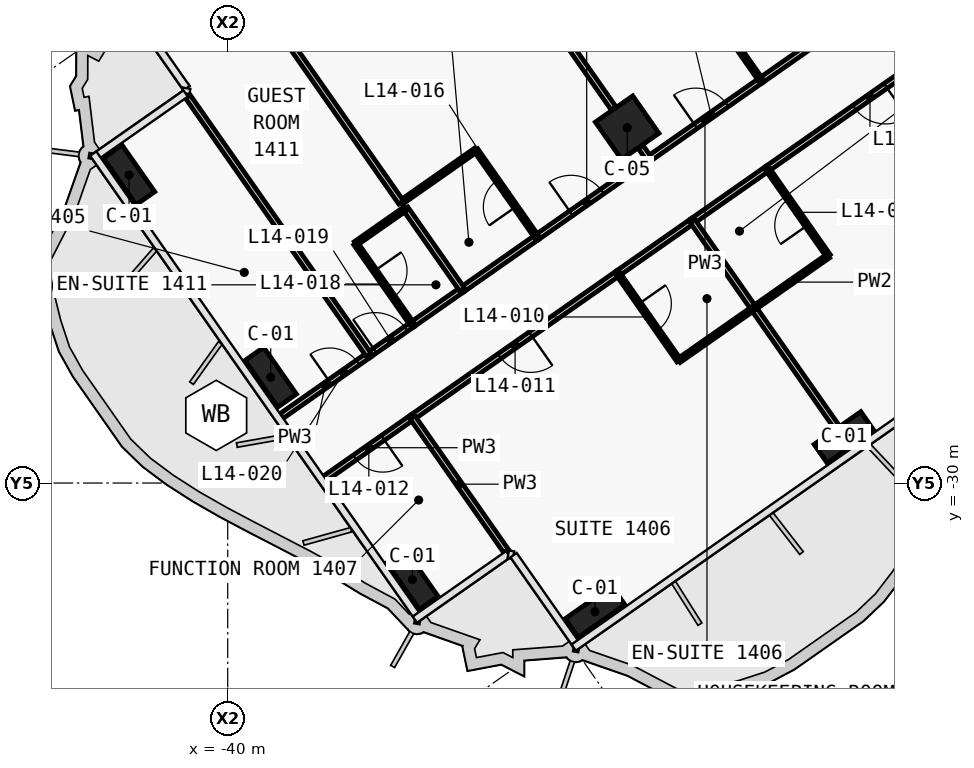
"""IFC4 building model, lengths in metres.
Left out: names, types, materials, properties, quantities, classifications, styles, units other than length and angle.
Written with IfcOpenShell. Run it as: python <this file> out.ifc"""

import sys

from ifc_helpers import new_model, si_unit, direction, frame, frame_2d, origin, origin_2d, place, context, subcontext, project, spatial, rectangle, extrude, element, fill, save


model = new_model("IFC4")
c1 = context("Model", 3, precision=1e-05, world=origin(), true_north=direction((0.0, 1.0)))
c2 = subcontext(c1, "Body", "Model", "MODEL_VIEW")
j1 = project(units=[si_unit("LENGTHUNIT", "METRE"), si_unit("PLANEANGLEUNIT", "RADIAN")], contexts=[c1])
p1 = place(None, origin())
s1 = spatial("IfcSite", under=j1, at=p1, CompositionType="ELEMENT")
p2 = place(p1, origin())
s2 = spatial("IfcBuilding", under=s1, at=p2, CompositionType="ELEMENT")
p3 = place(p2, frame((0.0, 0.0, 76.1)))
s3 = spatial("IfcBuildingStorey", under=s2, at=p3, CompositionType="ELEMENT", Elevation=76.1)
for number, where, z_axis, x_axis in (
    (1, (-23.782, -28.799, 0.0), (0.0, 0.0, 1.0), (-0.819, -0.574, 0.0)),
    (2, (-30.336, -33.388, 0.0), (0.0, 0.0, 1.0), (-0.819, -0.574, 0.0)),
    (3, (-35.14, -32.541, 0.0), (0.0, 0.0, 1.0), (-0.574, 0.819, 0.0)),
    (4, (-38.869, -27.216, 0.0), (0.0, 0.0, 1.0), (-0.574, 0.819, 0.0)),
    (5, (-42.597, -21.892, 0.0), (0.0, 0.0, 1.0), (-0.574, 0.819, 0.0)),
):
    element("IfcColumn", number, at=place(p3, frame(where, z_axis=z_axis, x_axis=x_axis)), inside=s3, PredefinedType="COLUMN", context=c2, shape_type="SweptSolid", body=[
        extrude(rectangle(XDim=1.5, YDim=0.6, at=origin_2d()), origin(), (0.0, 0.0, 1.0), 3.6),
    ])
p4 = place(p3, frame((-29.49, -20.649, 0.0), z_axis=(0.0, 0.0, 1.0), x_axis=(-0.819152044289, -0.573576436351, 0.0)))
e6 = element("IfcColumn", 6, at=p4, inside=s3, PredefinedType="COLUMN", context=c2, shape_type="SweptSolid", body=[
    extrude(rectangle(XDim=1.2, YDim=1.2, at=origin_2d()), origin(), (0.0, 0.0, 1.0), 3.6),
])
p5 = place(p3, frame((-28.917, -21.469, 0.0), z_axis=(0.0, 0.0, 1.0), x_axis=(0.81917779803, 0.57353965444, 0.0)))
e7 = element("IfcWall", 7, at=p5, inside=s3, PredefinedType="PARTITIONING", context=c2, shape_type="SweptSolid", body=[
    extrude(rectangle(XDim=3.603, YDim=0.15, at=frame_2d((1.801, 0.0))), origin(), (0.0, 0.0, 1.0), 2.6),
])
p6 = place(p5, frame((1.502, 0.0, 0.0)))
e8 = element("IfcOpeningElement", 8, at=p6, cuts=e7, PredefinedType="OPENING", context=c2, shape_type="SweptSolid", body=[
    extrude(rectangle(XDim=1.0, YDim=2.1, at=frame_2d((0.5, 1.05))), frame((0.0, 0.085, 0.0), z_axis=(0.0, -1.0, 0.0), x_axis=(1.0, 0.0, 0.0)), (0.0, 0.0, 1.0), 0.17),
])
p7 = place(p3, frame((-25.969, -19.404, 0.0), z_axis=(0.0, 0.0, 1.0), x_axis=(0.819146032251, 0.573585022335, 0.0)))
e9 = element("IfcWall", 9, at=p7, inside=s3, PredefinedType="PARTITIONING", context=c2, shape_type="SweptSolid", body=[
    extrude(rectangle(XDim=2.404, YDim=0.15, at=frame_2d((1.202, 0.0))), origin(), (0.0, 0.0, 1.0), 3.32),
])
p8 = place(p3, frame((-31.866, -23.533, 0.0), z_axis=(0.0, 0.0, 1.0), x_axis=(0.819145961204, 0.573585123798, 0.0)))
e10 = element("IfcWall", 10, at=p8, inside=s3, PredefinedType="PARTITIONING", context=c2, shape_type="SweptSolid", body=[
    extrude(rectangle(XDim=3.603, YDim=0.15, at=frame_2d((1.802, 0.0))), origin(), (0.0, 0.0, 1.0), 2.6),
])
p9 = place(p8, frame((1.101, 0.0, 0.0)))
e11 = element("IfcOpeningElement", 11, at=p9, cuts=e10, PredefinedType="OPENING", context=c2, shape_type="SweptSolid", body=[
    extrude(rectangle(XDim=1.0, YDim=2.1, at=frame_2d((0.5, 1.05))), frame((0.0, 0.085, 0.0), z_axis=(0.0, -1.0, 0.0), x_axis=(1.0, 0.0, 0.0)), (0.0, 0.0, 1.0), 0.17),
])
p10 = place(p3, frame((-33.833, -24.91, 0.0), z_axis=(0.0, 0.0, 1.0), x_axis=(0.819146032251, 0.573585022335, 0.0)))
e12 = element("IfcWall", 12, at=p10, inside=s3, PredefinedType="PARTITIONING", context=c2, shape_type="SweptSolid", body=[
    extrude(rectangle(XDim=2.404, YDim=0.15, at=frame_2d((1.202, 0.0))), origin(), (0.0, 0.0, 1.0), 3.32),
])
p11 = place(p3, frame((-36.29, -26.631, 0.0), z_axis=(0.0, 0.0, 1.0), x_axis=(0.81914197737, 0.573590813132, 0.0)))
e13 = element("IfcWall", 13, at=p11, inside=s3, PredefinedType="PARTITIONING", context=c2, shape_type="SweptSolid", body=[
    extrude(rectangle(XDim=1.403, YDim=0.15, at=frame_2d((0.701, 0.0))), origin(), (0.0, 0.0, 1.0), 3.32),
])
p12 = place(p11, frame((0.202, 0.0, 0.0)))
e14 = element("IfcOpeningElement", 14, at=p12, cuts=e13, PredefinedType="OPENING", context=c2, shape_type="SweptSolid", body=[
    extrude(rectangle(XDim=1.0, YDim=2.1, at=frame_2d((0.5, 1.05))), frame((0.0, 0.085, 0.0), z_axis=(0.0, -1.0, 0.0), x_axis=(1.0, 0.0, 0.0)), (0.0, 0.0, 1.0), 0.17),
])
p13 = place(p3, frame((-35.143, -25.828, 0.0), z_axis=(0.0, 0.0, 1.0), x_axis=(0.819189013667, 0.573523634986, 0.0)))
e15 = element("IfcWall", 15, at=p13, inside=s3, PredefinedType="PARTITIONING", context=c2, shape_type="SweptSolid", body=[
    extrude(rectangle(XDim=1.604, YDim=0.15, at=frame_2d((0.802, 0.0))), origin(), (0.0, 0.0, 1.0), 3.32),
])
p14 = place(p3, frame((-38.582, -28.236, 0.0), z_axis=(0.0, 0.0, 1.0), x_axis=(0.819137759006, 0.573596837309, 0.0)))
e16 = element("IfcWall", 16, at=p14, inside=s3, PredefinedType="PARTITIONING", context=c2, shape_type="SweptSolid", body=[
    extrude(rectangle(XDim=2.802, YDim=0.15, at=frame_2d((1.401, 0.0))), origin(), (0.0, 0.0, 1.0), 2.5),
])
p15 = place(p14, frame((1.551, 0.0, 0.0)))
e17 = element("IfcOpeningElement", 17, at=p15, cuts=e16, PredefinedType="OPENING", context=c2, shape_type="SweptSolid", body=[
    extrude(rectangle(XDim=0.9, YDim=2.1, at=frame_2d((0.45, 1.05))), frame((0.0, 0.085, 0.0), z_axis=(0.0, -1.0, 0.0), x_axis=(1.0, 0.0, 0.0)), (0.0, 0.0, 1.0), 0.17),
])
p16 = place(p3, frame((-20.395, -17.943, 0.0), z_axis=(0.0, 0.0, 1.0), x_axis=(-0.819153746897, -0.573574004767, 0.0)))
e18 = element("IfcWall", 18, at=p16, inside=s3, PredefinedType="PARTITIONING", context=c2, shape_type="SweptSolid", body=[
    extrude(rectangle(XDim=6.603, YDim=0.15, at=frame_2d((3.302, 0.0))), origin(), (0.0, 0.0, 1.0), 2.6),
])
p17 = place(p16, frame((2.802, 0.0, 0.0)))
e19 = element("IfcOpeningElement", 19, at=p17, cuts=e18, PredefinedType="OPENING", context=c2, shape_type="SweptSolid", body=[
    extrude(rectangle(XDim=1.0, YDim=2.1, at=frame_2d((0.5, 1.05))), frame((0.0, 0.085, 0.0), z_axis=(0.0, -1.0, 0.0), x_axis=(1.0, 0.0, 0.0)), (0.0, 0.0, 1.0), 0.17),
])
p18 = place(p3, frame((-25.801, -21.729, 0.0), z_axis=(0.0, 0.0, 1.0), x_axis=(-0.819179439794, -0.573537309527, 0.0)))
e20 = element("IfcWall", 20, at=p18, inside=s3, PredefinedType="PARTITIONING", context=c2, shape_type="SweptSolid", body=[
    extrude(rectangle(XDim=2.404, YDim=0.15, at=frame_2d((1.202, 0.0))), origin(), (0.0, 0.0, 1.0), 2.6),
])
p19 = place(p3, frame((-29.734, -24.482, 0.0), z_axis=(0.0, 0.0, 1.0), x_axis=(-0.819153746897, -0.573574004767, 0.0)))
e21 = element("IfcWall", 21, at=p19, inside=s3, PredefinedType="PARTITIONING", context=c2, shape_type="SweptSolid", body=[
    extrude(rectangle(XDim=6.603, YDim=0.15, at=frame_2d((3.302, 0.0))), origin(), (0.0, 0.0, 1.0), 3.32),
])
p20 = place(p19, frame((2.801, 0.0, 0.0)))
e22 = element("IfcOpeningElement", 22, at=p20, cuts=e21, PredefinedType="OPENING", context=c2, shape_type="SweptSolid", body=[
    extrude(rectangle(XDim=1.0, YDim=2.1, at=frame_2d((0.5, 1.05))), frame((0.0, 0.085, 0.0), z_axis=(0.0, -1.0, 0.0), x_axis=(1.0, 0.0, 0.0)), (0.0, 0.0, 1.0), 0.17),
])
p21 = place(p3, frame((-27.767, -23.105, 0.0), z_axis=(0.0, 0.0, 1.0), x_axis=(-0.819146032251, -0.573585022335, 0.0)))
e23 = element("IfcWall", 23, at=p21, inside=s3, PredefinedType="PARTITIONING", context=c2, shape_type="SweptSolid", body=[
    extrude(rectangle(XDim=2.404, YDim=0.15, at=frame_2d((1.202, 0.0))), origin(), (0.0, 0.0, 1.0), 2.6),
])
p22 = place(p3, frame((-35.139, -28.267, 0.0), z_axis=(0.0, 0.0, 1.0), x_axis=(-0.819125488359, -0.573614360281, 0.0)))
e24 = element("IfcWall", 24, at=p22, inside=s3, PredefinedType="PARTITIONING", context=c2, shape_type="SweptSolid", body=[
    extrude(rectangle(XDim=2.802, YDim=0.15, at=frame_2d((1.401, 0.0))), origin(), (0.0, 0.0, 1.0), 2.5),
])
p23 = place(p22, frame((0.951, 0.0, 0.0)))
e25 = element("IfcOpeningElement", 25, at=p23, cuts=e24, PredefinedType="OPENING", context=c2, shape_type="SweptSolid", body=[
    extrude(rectangle(XDim=0.9, YDim=2.1, at=frame_2d((0.45, 1.05))), frame((0.0, 0.085, 0.0), z_axis=(0.0, -1.0, 0.0), x_axis=(1.0, 0.0, 0.0)), (0.0, 0.0, 1.0), 0.17),
])
p24 = place(p3, frame((-27.574, -17.11, 0.0), z_axis=(0.0, 0.0, 1.0), x_axis=(0.573591086599, -0.819141785879, 0.0)))
e26 = element("IfcWall", 26, at=p24, inside=s3, PredefinedType="PARTITIONING", context=c2, shape_type="SweptSolid", body=[
    extrude(rectangle(XDim=2.8, YDim=0.12, at=frame_2d((1.4, 0.0))), origin(), (0.0, 0.0, 1.0), 2.6),
])
p25 = place(p24, frame((0.975, 0.0, 0.0)))
e27 = element("IfcOpeningElement", 27, at=p25, cuts=e26, PredefinedType="OPENING", context=c2, shape_type="SweptSolid", body=[
    extrude(rectangle(XDim=0.85, YDim=2.05, at=frame_2d((0.425, 1.025))), frame((0.0, 0.07, 0.0), z_axis=(0.0, -1.0, 0.0), x_axis=(1.0, 0.0, 0.0)), (0.0, 0.0, 1.0), 0.14),
])
p26 = place(p3, frame((-28.916, -21.468, 0.0), z_axis=(0.0, 0.0, 1.0), x_axis=(-0.572944929411, 0.819593867633, 0.0)))
e28 = element("IfcWall", 28, at=p26, inside=s3, PredefinedType="PARTITIONING", context=c2, shape_type="SweptSolid", body=[
    extrude(rectangle(XDim=0.38, YDim=0.15, at=frame_2d((0.19, 0.0))), origin(), (0.0, 0.0, 1.0), 2.6),
])
p27 = place(p3, frame((-29.845, -20.141, 0.0), z_axis=(0.0, 0.0, 1.0), x_axis=(-0.573558725113, 0.819164445546, 0.0)))
e29 = element("IfcWall", 29, at=p27, inside=s3, PredefinedType="PARTITIONING", context=c2, shape_type="SweptSolid", body=[
    extrude(rectangle(XDim=9.01, YDim=0.15, at=frame_2d((4.505, 0.0))), origin(), (0.0, 0.0, 1.0), 2.6),
])
p28 = place(p3, frame((-31.864, -23.532, 0.0), z_axis=(0.0, 0.0, 1.0), x_axis=(-0.573550118428, 0.819170471667, 0.0)))
e30 = element("IfcWall", 30, at=p28, inside=s3, PredefinedType="PARTITIONING", context=c2, shape_type="SweptSolid", body=[
    extrude(rectangle(XDim=2.8, YDim=0.12, at=frame_2d((1.4, 0.0))), origin(), (0.0, 0.0, 1.0), 2.6),
])
p29 = place(p28, frame((0.975, 0.0, 0.0)))
e31 = element("IfcOpeningElement", 31, at=p29, cuts=e30, PredefinedType="OPENING", context=c2, shape_type="SweptSolid", body=[
    extrude(rectangle(XDim=0.85, YDim=2.05, at=frame_2d((0.425, 1.025))), frame((0.0, 0.07, 0.0), z_axis=(0.0, -1.0, 0.0), x_axis=(1.0, 0.0, 0.0)), (0.0, 0.0, 1.0), 0.14),
])
p30 = place(p3, frame((-33.471, -21.238, 0.0), z_axis=(0.0, 0.0, 1.0), x_axis=(-0.819141114317, -0.573592045652, 0.0)))
e32 = element("IfcWall", 32, at=p30, inside=s3, PredefinedType="PARTITIONING", context=c2, shape_type="SweptSolid", body=[
    extrude(rectangle(XDim=2.4, YDim=0.12, at=frame_2d((1.2, 0.0))), origin(), (0.0, 0.0, 1.0), 3.32),
])
p31 = place(p3, frame((-35.438, -22.615, 0.0), z_axis=(0.0, 0.0, 1.0), x_axis=(-0.573560662175, 0.81916308926, 0.0)))
e33 = element("IfcWall", 33, at=p31, inside=s3, PredefinedType="PARTITIONING", context=c2, shape_type="SweptSolid", body=[
    extrude(rectangle(XDim=8.499, YDim=0.15, at=frame_2d((4.25, 0.0))), origin(), (0.0, 0.0, 1.0), 2.5),
])
p32 = place(p3, frame((-33.831, -24.909, 0.0), z_axis=(0.0, 0.0, 1.0), x_axis=(-0.573544201094, 0.819174614714, 0.0)))
e34 = element("IfcWall", 34, at=p32, inside=s3, PredefinedType="PARTITIONING", context=c2, shape_type="SweptSolid", body=[
    extrude(rectangle(XDim=2.602, YDim=0.15, at=frame_2d((1.301, 0.0))), origin(), (0.0, 0.0, 1.0), 2.6),
])
p33 = place(p3, frame((-35.323, -22.779, 0.0), z_axis=(0.0, 0.0, 1.0), x_axis=(-0.819131543282, -0.57360571371, 0.0)))
e35 = element("IfcWall", 35, at=p33, inside=s3, PredefinedType="PARTITIONING", context=c2, shape_type="SweptSolid", body=[
    extrude(rectangle(XDim=1.6, YDim=0.12, at=frame_2d((0.8, 0.0))), origin(), (0.0, 0.0, 1.0), 3.32),
])
p34 = place(p3, frame((-36.634, -23.698, 0.0), z_axis=(0.0, 0.0, 1.0), x_axis=(0.573582085028, -0.819148089014, 0.0)))
e36 = element("IfcWall", 36, at=p34, inside=s3, PredefinedType="PARTITIONING", context=c2, shape_type="SweptSolid", body=[
    extrude(rectangle(XDim=2.6, YDim=0.12, at=frame_2d((1.3, 0.0))), origin(), (0.0, 0.0, 1.0), 2.6),
])
p35 = place(p34, frame((0.875, 0.0, 0.0)))
e37 = element("IfcOpeningElement", 37, at=p35, cuts=e36, PredefinedType="OPENING", context=c2, shape_type="SweptSolid", body=[
    extrude(rectangle(XDim=0.85, YDim=2.05, at=frame_2d((0.425, 1.025))), frame((0.0, 0.07, 0.0), z_axis=(0.0, -1.0, 0.0), x_axis=(1.0, 0.0, 0.0)), (0.0, 0.0, 1.0), 0.14),
])
p36 = place(p3, frame((-36.288, -26.63, 0.0), z_axis=(0.0, 0.0, 1.0), x_axis=(-0.573555124968, 0.819166966267, 0.0)))
e38 = element("IfcWall", 38, at=p36, inside=s3, PredefinedType="PARTITIONING", context=c2, shape_type="SweptSolid", body=[
    extrude(rectangle(XDim=8.3, YDim=0.15, at=frame_2d((4.15, 0.0))), origin(), (0.0, 0.0, 1.0), 2.6),
])
p37 = place(p3, frame((-26.162, -25.401, 0.0), z_axis=(0.0, 0.0, 1.0), x_axis=(0.819155442668, 0.573571582932, 0.0)))
e39 = element("IfcWall", 39, at=p37, inside=s3, PredefinedType="PARTITIONING", context=c2, shape_type="SweptSolid", body=[
    extrude(rectangle(XDim=2.4, YDim=0.12, at=frame_2d((1.2, 0.0))), origin(), (0.0, 0.0, 1.0), 2.6),
])
p38 = place(p3, frame((-24.196, -24.023, 0.0), z_axis=(0.0, 0.0, 1.0), x_axis=(-0.573608623498, 0.819129505664, 0.0)))
e40 = element("IfcWall", 40, at=p38, inside=s3, PredefinedType="PARTITIONING", context=c2, shape_type="SweptSolid", body=[
    extrude(rectangle(XDim=2.8, YDim=0.12, at=frame_2d((1.4, 0.0))), origin(), (0.0, 0.0, 1.0), 3.32),
])
p39 = place(p38, frame((0.975, 0.0, 0.0)))
e41 = element("IfcOpeningElement", 41, at=p39, cuts=e40, PredefinedType="OPENING", context=c2, shape_type="SweptSolid", body=[
    extrude(rectangle(XDim=0.85, YDim=2.05, at=frame_2d((0.425, 1.025))), frame((0.0, 0.07, 0.0), z_axis=(0.0, -1.0, 0.0), x_axis=(1.0, 0.0, 0.0)), (0.0, 0.0, 1.0), 0.14),
])
p40 = place(p3, frame((-23.966, -28.537, 0.0), z_axis=(0.0, 0.0, 1.0), x_axis=(-0.573594994199, 0.819139049631, 0.0)))
e42 = element("IfcWall", 42, at=p40, inside=s3, PredefinedType="PARTITIONING", context=c2, shape_type="SweptSolid", body=[
    extrude(rectangle(XDim=3.829, YDim=0.15, at=frame_2d((1.915, 0.0))), origin(), (0.0, 0.0, 1.0), 2.6),
])
p41 = place(p3, frame((-26.163, -25.4, 0.0), z_axis=(0.0, 0.0, 1.0), x_axis=(-0.573608623498, 0.819129505664, 0.0)))
e43 = element("IfcWall", 43, at=p41, inside=s3, PredefinedType="PARTITIONING", context=c2, shape_type="SweptSolid", body=[
    extrude(rectangle(XDim=2.8, YDim=0.15, at=frame_2d((1.4, 0.0))), origin(), (0.0, 0.0, 1.0), 2.6),
])
p42 = place(p3, frame((-29.736, -24.483, 0.0), z_axis=(0.0, 0.0, 1.0), x_axis=(0.573608623498, -0.819129505664, 0.0)))
e44 = element("IfcWall", 44, at=p42, inside=s3, PredefinedType="PARTITIONING", context=c2, shape_type="SweptSolid", body=[
    extrude(rectangle(XDim=2.8, YDim=0.12, at=frame_2d((1.4, 0.0))), origin(), (0.0, 0.0, 1.0), 3.32),
])
p43 = place(p42, frame((0.975, 0.0, 0.0)))
e45 = element("IfcOpeningElement", 45, at=p43, cuts=e44, PredefinedType="OPENING", context=c2, shape_type="SweptSolid", body=[
    extrude(rectangle(XDim=0.85, YDim=2.05, at=frame_2d((0.425, 1.025))), frame((0.0, 0.07, 0.0), z_axis=(0.0, -1.0, 0.0), x_axis=(1.0, 0.0, 0.0)), (0.0, 0.0, 1.0), 0.14),
])
p44 = place(p3, frame((-28.128, -26.777, 0.0), z_axis=(0.0, 0.0, 1.0), x_axis=(0.819188907105, 0.573523787192, 0.0)))
e46 = element("IfcWall", 46, at=p44, inside=s3, PredefinedType="PARTITIONING", context=c2, shape_type="SweptSolid", body=[
    extrude(rectangle(XDim=2.4, YDim=0.12, at=frame_2d((1.2, 0.0))), origin(), (0.0, 0.0, 1.0), 2.6),
])
p45 = place(p3, frame((-32.675, -31.791, 0.0), z_axis=(0.0, 0.0, 1.0), x_axis=(-0.573553792486, 0.819167899227, 0.0)))
e47 = element("IfcWall", 47, at=p45, inside=s3, PredefinedType="PARTITIONING", context=c2, shape_type="SweptSolid", body=[
    extrude(rectangle(XDim=4.3, YDim=0.15, at=frame_2d((2.15, 0.0))), origin(), (0.0, 0.0, 1.0), 3.32),
])
p46 = place(p39, origin())
e48 = element("IfcDoor", 48, at=p46, inside=s3, OperationType="SINGLE_SWING_RIGHT", PredefinedType="DOOR", context=c2, shape_type="SweptSolid", body=[
    extrude(rectangle(XDim=0.85, YDim=2.05, at=frame_2d((0.425, 1.025))), frame((0.0, 0.025, 0.0), z_axis=(0.0, -1.0, 0.0), x_axis=(1.0, 0.0, 0.0)), (0.0, 0.0, 1.0), 0.05),
])
fill(e41, e48)
p47 = place(p17, origin())
e49 = element("IfcDoor", 49, at=p47, inside=s3, OperationType="SINGLE_SWING_RIGHT", PredefinedType="DOOR", context=c2, shape_type="SweptSolid", body=[
    extrude(rectangle(XDim=1.0, YDim=2.1, at=frame_2d((0.5, 1.05))), frame((0.0, 0.025, 0.0), z_axis=(0.0, -1.0, 0.0), x_axis=(1.0, 0.0, 0.0)), (0.0, 0.0, 1.0), 0.05),
])
fill(e19, e49)
p48 = place(p43, origin())
e50 = element("IfcDoor", 50, at=p48, inside=s3, OperationType="SINGLE_SWING_RIGHT", PredefinedType="DOOR", context=c2, shape_type="SweptSolid", body=[
    extrude(rectangle(XDim=0.85, YDim=2.05, at=frame_2d((0.425, 1.025))), frame((0.0, 0.025, 0.0), z_axis=(0.0, -1.0, 0.0), x_axis=(1.0, 0.0, 0.0)), (0.0, 0.0, 1.0), 0.05),
])
fill(e45, e50)
p49 = place(p20, origin())
e51 = element("IfcDoor", 51, at=p49, inside=s3, OperationType="SINGLE_SWING_RIGHT", PredefinedType="DOOR", context=c2, shape_type="SweptSolid", body=[
    extrude(rectangle(XDim=1.0, YDim=2.1, at=frame_2d((0.5, 1.05))), frame((0.0, 0.025, 0.0), z_axis=(0.0, -1.0, 0.0), x_axis=(1.0, 0.0, 0.0)), (0.0, 0.0, 1.0), 0.05),
])
fill(e22, e51)
p50 = place(p23, origin())
e52 = element("IfcDoor", 52, at=p50, inside=s3, OperationType="SINGLE_SWING_RIGHT", PredefinedType="DOOR", context=c2, shape_type="SweptSolid", body=[
    extrude(rectangle(XDim=0.9, YDim=2.1, at=frame_2d((0.45, 1.05))), frame((0.0, 0.025, 0.0), z_axis=(0.0, -1.0, 0.0), x_axis=(1.0, 0.0, 0.0)), (0.0, 0.0, 1.0), 0.05),
])
fill(e25, e52)
p51 = place(p6, origin())
e53 = element("IfcDoor", 53, at=p51, inside=s3, OperationType="SINGLE_SWING_LEFT", PredefinedType="DOOR", context=c2, shape_type="SweptSolid", body=[
    extrude(rectangle(XDim=1.0, YDim=2.1, at=frame_2d((0.5, 1.05))), frame((0.0, 0.025, 0.0), z_axis=(0.0, -1.0, 0.0), x_axis=(1.0, 0.0, 0.0)), (0.0, 0.0, 1.0), 0.05),
])
fill(e8, e53)
p52 = place(p29, origin())
e54 = element("IfcDoor", 54, at=p52, inside=s3, OperationType="SINGLE_SWING_RIGHT", PredefinedType="DOOR", context=c2, shape_type="SweptSolid", body=[
    extrude(rectangle(XDim=0.85, YDim=2.05, at=frame_2d((0.425, 1.025))), frame((0.0, 0.025, 0.0), z_axis=(0.0, -1.0, 0.0), x_axis=(1.0, 0.0, 0.0)), (0.0, 0.0, 1.0), 0.05),
])
fill(e31, e54)
p53 = place(p9, origin())
e55 = element("IfcDoor", 55, at=p53, inside=s3, OperationType="SINGLE_SWING_LEFT", PredefinedType="DOOR", context=c2, shape_type="SweptSolid", body=[
    extrude(rectangle(XDim=1.0, YDim=2.1, at=frame_2d((0.5, 1.05))), frame((0.0, 0.025, 0.0), z_axis=(0.0, -1.0, 0.0), x_axis=(1.0, 0.0, 0.0)), (0.0, 0.0, 1.0), 0.05),
])
fill(e11, e55)
p54 = place(p35, origin())
e56 = element("IfcDoor", 56, at=p54, inside=s3, OperationType="SINGLE_SWING_LEFT", PredefinedType="DOOR", context=c2, shape_type="SweptSolid", body=[
    extrude(rectangle(XDim=0.85, YDim=2.05, at=frame_2d((0.425, 1.025))), frame((0.0, 0.025, 0.0), z_axis=(0.0, -1.0, 0.0), x_axis=(1.0, 0.0, 0.0)), (0.0, 0.0, 1.0), 0.05),
])
fill(e37, e56)
p55 = place(p12, origin())
e57 = element("IfcDoor", 57, at=p55, inside=s3, OperationType="SINGLE_SWING_RIGHT", PredefinedType="DOOR", context=c2, shape_type="SweptSolid", body=[
    extrude(rectangle(XDim=1.0, YDim=2.1, at=frame_2d((0.5, 1.05))), frame((0.0, 0.025, 0.0), z_axis=(0.0, -1.0, 0.0), x_axis=(1.0, 0.0, 0.0)), (0.0, 0.0, 1.0), 0.05),
])
fill(e14, e57)
p56 = place(p15, origin())
e58 = element("IfcDoor", 58, at=p56, inside=s3, OperationType="SINGLE_SWING_RIGHT", PredefinedType="DOOR", context=c2, shape_type="SweptSolid", body=[
    extrude(rectangle(XDim=0.9, YDim=2.1, at=frame_2d((0.45, 1.05))), frame((0.0, 0.025, 0.0), z_axis=(0.0, -1.0, 0.0), x_axis=(1.0, 0.0, 0.0)), (0.0, 0.0, 1.0), 0.05),
])
fill(e17, e58)
save(model, sys.argv[1])
